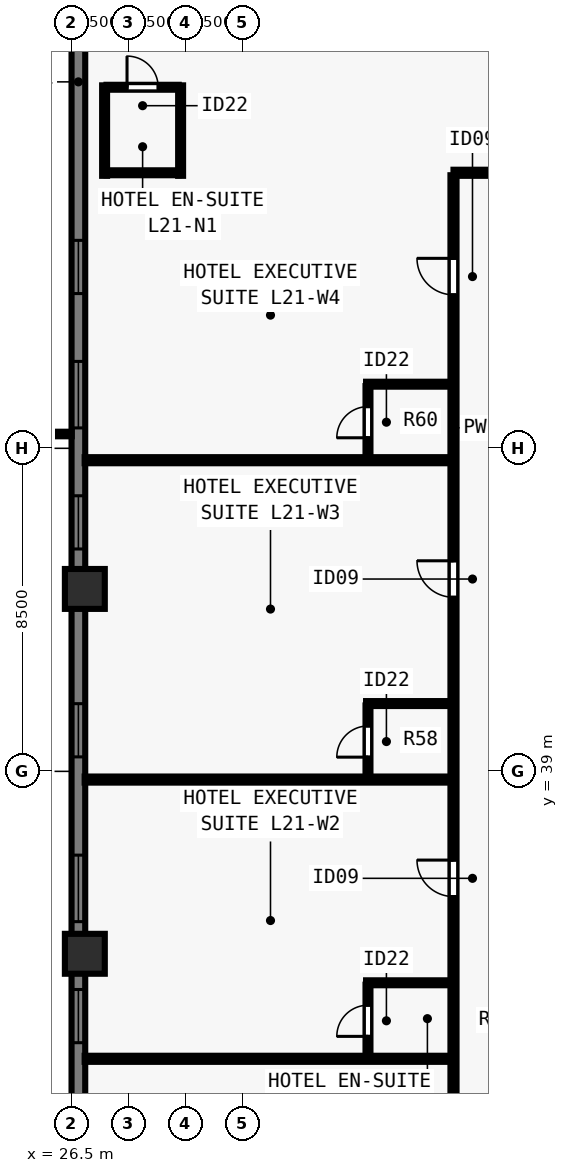
"""IFC4 building model, lengths in metres.
Left out: names, types, materials, properties, quantities, classifications, styles, units other than length and angle.
Written with IfcOpenShell. Run it as: python <this file> out.ifc"""

import sys

from ifc_helpers import new_model, si_unit, direction, frame, frame_2d, origin, origin_2d, place, context, subcontext, project, spatial, rectangle, extrude, element, fill, save


model = new_model("IFC4")
c1 = context("Model", 3, precision=1e-05, world=origin(), true_north=direction((0.0, 1.0)))
c2 = subcontext(c1, "Body", "Model", "MODEL_VIEW")
j1 = project(units=[si_unit("LENGTHUNIT", "METRE"), si_unit("PLANEANGLEUNIT", "RADIAN")], contexts=[c1])
p1 = place(None, origin())
s1 = spatial("IfcSite", under=j1, at=p1, CompositionType="ELEMENT")
p2 = place(p1, origin())
s2 = spatial("IfcBuilding", under=s1, at=p2, CompositionType="ELEMENT")
p3 = place(p2, frame((0.0, 0.0, 79.5)))
s3 = spatial("IfcBuildingStorey", under=s2, at=p3, CompositionType="ELEMENT", Elevation=79.5)
for number, where, z_axis, x_axis in (
    (1, (26.85, 43.8, 0.0), (0.0, 0.0, 1.0), (0.0, 1.0, 0.0)),
    (2, (26.85, 34.2, 0.0), (0.0, 0.0, 1.0), (0.0, 1.0, 0.0)),
):
    element("IfcColumn", number, at=place(p3, frame(where, z_axis=z_axis, x_axis=x_axis)), inside=s3, PredefinedType="COLUMN", context=c2, shape_type="SweptSolid", body=[
        extrude(rectangle(XDim=1.05, YDim=1.05, at=origin_2d()), origin(), (0.0, 0.0, 1.0), 3.5),
    ])
p4 = place(p3, frame((26.68, 16.5, 0.0), z_axis=(0.0, 0.0, 1.0), x_axis=(0.0, 1.0, 0.0)))
e3 = element("IfcWall", 3, at=p4, inside=s3, PredefinedType="SOLIDWALL", context=c2, shape_type="SweptSolid", body=[
    extrude(rectangle(XDim=44.662, YDim=0.36, at=frame_2d((22.331, 0.0))), origin(), (0.0, 0.0, 1.0), 3.28),
])
p5 = place(p4, frame((8.19, 0.0, 0.8)))
e4 = element("IfcOpeningElement", 4, at=p5, cuts=e3, PredefinedType="OPENING", context=c2, shape_type="SweptSolid", body=[
    extrude(rectangle(XDim=1.4, YDim=1.544, at=frame_2d((0.7, 0.772))), frame((0.0, 0.19, 0.0), z_axis=(0.0, -1.0, 0.0), x_axis=(1.0, 0.0, 0.0)), (0.0, 0.0, 1.0), 0.38),
])
p6 = place(p4, frame((11.375, 0.0, 0.8)))
e5 = element("IfcOpeningElement", 5, at=p6, cuts=e3, PredefinedType="OPENING", context=c2, shape_type="SweptSolid", body=[
    extrude(rectangle(XDim=1.75, YDim=1.544, at=frame_2d((0.875, 0.772))), frame((0.0, 0.19, 0.0), z_axis=(0.0, -1.0, 0.0), x_axis=(1.0, 0.0, 0.0)), (0.0, 0.0, 1.0), 0.38),
])
p7 = place(p4, frame((15.361, 0.0, 0.8)))
e6 = element("IfcOpeningElement", 6, at=p7, cuts=e3, PredefinedType="OPENING", context=c2, shape_type="SweptSolid", body=[
    extrude(rectangle(XDim=1.4, YDim=1.544, at=frame_2d((0.7, 0.772))), frame((0.0, 0.19, 0.0), z_axis=(0.0, -1.0, 0.0), x_axis=(1.0, 0.0, 0.0)), (0.0, 0.0, 1.0), 0.38),
])
p8 = place(p4, frame((18.546, 0.0, 0.8)))
e7 = element("IfcOpeningElement", 7, at=p8, cuts=e3, PredefinedType="OPENING", context=c2, shape_type="SweptSolid", body=[
    extrude(rectangle(XDim=1.75, YDim=1.544, at=frame_2d((0.875, 0.772))), frame((0.0, 0.19, 0.0), z_axis=(0.0, -1.0, 0.0), x_axis=(1.0, 0.0, 0.0)), (0.0, 0.0, 1.0), 0.38),
])
p9 = place(p4, frame((22.881, 0.0, 0.8)))
e8 = element("IfcOpeningElement", 8, at=p9, cuts=e3, PredefinedType="OPENING", context=c2, shape_type="SweptSolid", body=[
    extrude(rectangle(XDim=1.4, YDim=1.544, at=frame_2d((0.7, 0.772))), frame((0.0, 0.19, 0.0), z_axis=(0.0, -1.0, 0.0), x_axis=(1.0, 0.0, 0.0)), (0.0, 0.0, 1.0), 0.38),
])
p10 = place(p4, frame((28.351, 0.0, 0.8)))
e9 = element("IfcOpeningElement", 9, at=p10, cuts=e3, PredefinedType="OPENING", context=c2, shape_type="SweptSolid", body=[
    extrude(rectangle(XDim=1.4, YDim=1.544, at=frame_2d((0.7, 0.772))), frame((0.0, 0.19, 0.0), z_axis=(0.0, -1.0, 0.0), x_axis=(1.0, 0.0, 0.0)), (0.0, 0.0, 1.0), 0.38),
])
p11 = place(p4, frame((31.537, 0.0, 0.8)))
e10 = element("IfcOpeningElement", 10, at=p11, cuts=e3, PredefinedType="OPENING", context=c2, shape_type="SweptSolid", body=[
    extrude(rectangle(XDim=1.75, YDim=1.544, at=frame_2d((0.875, 0.772))), frame((0.0, 0.19, 0.0), z_axis=(0.0, -1.0, 0.0), x_axis=(1.0, 0.0, 0.0)), (0.0, 0.0, 1.0), 0.38),
])
p12 = place(p4, frame((35.072, 0.0, 0.8)))
e11 = element("IfcOpeningElement", 11, at=p12, cuts=e3, PredefinedType="OPENING", context=c2, shape_type="SweptSolid", body=[
    extrude(rectangle(XDim=1.4, YDim=1.544, at=frame_2d((0.7, 0.772))), frame((0.0, 0.19, 0.0), z_axis=(0.0, -1.0, 0.0), x_axis=(1.0, 0.0, 0.0)), (0.0, 0.0, 1.0), 0.38),
])
p13 = place(p3, frame((36.55, 54.75, 0.0), z_axis=(0.0, 0.0, 1.0), x_axis=(1.0, 0.0, 0.0)))
e12 = element("IfcWall", 12, at=p13, inside=s3, PredefinedType="PARTITIONING", context=c2, shape_type="SweptSolid", body=[
    extrude(rectangle(XDim=30.9, YDim=0.16, at=frame_2d((15.45, 0.0))), origin(), (0.0, 0.0, 1.0), 3.28),
])
p14 = place(p13, frame((2.83, 0.0, 0.0)))
e13 = element("IfcOpeningElement", 13, at=p14, cuts=e12, PredefinedType="OPENING", context=c2, shape_type="SweptSolid", body=[
    extrude(rectangle(XDim=0.96, YDim=2.15, at=frame_2d((0.48, 1.075))), frame((0.0, 0.09, 0.0), z_axis=(0.0, -1.0, 0.0), x_axis=(1.0, 0.0, 0.0)), (0.0, 0.0, 1.0), 0.18),
])
p15 = place(p13, frame((15.965, 0.0, 0.0)))
e14 = element("IfcOpeningElement", 14, at=p15, cuts=e12, PredefinedType="OPENING", context=c2, shape_type="SweptSolid", body=[
    extrude(rectangle(XDim=0.96, YDim=2.15, at=frame_2d((0.48, 1.075))), frame((0.0, 0.09, 0.0), z_axis=(0.0, -1.0, 0.0), x_axis=(1.0, 0.0, 0.0)), (0.0, 0.0, 1.0), 0.18),
])
p16 = place(p13, frame((28.105, 0.0, 0.0)))
e15 = element("IfcOpeningElement", 15, at=p16, cuts=e12, PredefinedType="OPENING", context=c2, shape_type="SweptSolid", body=[
    extrude(rectangle(XDim=0.96, YDim=2.15, at=frame_2d((0.48, 1.075))), frame((0.0, 0.09, 0.0), z_axis=(0.0, -1.0, 0.0), x_axis=(1.0, 0.0, 0.0)), (0.0, 0.0, 1.0), 0.18),
])
p17 = place(p3, frame((36.55, 23.315, 0.0), z_axis=(0.0, 0.0, 1.0), x_axis=(0.0, 1.0, 0.0)))
e16 = element("IfcWall", 16, at=p17, inside=s3, PredefinedType="PARTITIONING", context=c2, shape_type="SweptSolid", body=[
    extrude(rectangle(XDim=31.37, YDim=0.16, at=frame_2d((15.685, 0.0))), origin(), (0.0, 0.0, 1.0), 3.28),
])
p18 = place(p17, frame((4.848, 0.0, 0.0)))
e17 = element("IfcOpeningElement", 17, at=p18, cuts=e16, PredefinedType="OPENING", context=c2, shape_type="SweptSolid", body=[
    extrude(rectangle(XDim=0.96, YDim=2.15, at=frame_2d((0.48, 1.075))), frame((0.0, 0.09, 0.0), z_axis=(0.0, -1.0, 0.0), x_axis=(1.0, 0.0, 0.0)), (0.0, 0.0, 1.0), 0.18),
])
p19 = place(p17, frame((12.39, 0.0, 0.0)))
e18 = element("IfcOpeningElement", 18, at=p19, cuts=e16, PredefinedType="OPENING", context=c2, shape_type="SweptSolid", body=[
    extrude(rectangle(XDim=0.96, YDim=2.15, at=frame_2d((0.48, 1.075))), frame((0.0, 0.09, 0.0), z_axis=(0.0, -1.0, 0.0), x_axis=(1.0, 0.0, 0.0)), (0.0, 0.0, 1.0), 0.18),
])
p20 = place(p17, frame((20.265, 0.0, 0.0)))
e19 = element("IfcOpeningElement", 19, at=p20, cuts=e16, PredefinedType="OPENING", context=c2, shape_type="SweptSolid", body=[
    extrude(rectangle(XDim=0.96, YDim=2.15, at=frame_2d((0.48, 1.075))), frame((0.0, 0.09, 0.0), z_axis=(0.0, -1.0, 0.0), x_axis=(1.0, 0.0, 0.0)), (0.0, 0.0, 1.0), 0.18),
])
p21 = place(p17, frame((28.223, 0.0, 0.0)))
e20 = element("IfcOpeningElement", 20, at=p21, cuts=e16, PredefinedType="OPENING", context=c2, shape_type="SweptSolid", body=[
    extrude(rectangle(XDim=0.96, YDim=2.15, at=frame_2d((0.48, 1.075))), frame((0.0, 0.09, 0.0), z_axis=(0.0, -1.0, 0.0), x_axis=(1.0, 0.0, 0.0)), (0.0, 0.0, 1.0), 0.18),
])
for number, where, z_axis, x_axis in (
    (21, (27.37, 54.67, 0.0), (0.0, 0.0, 1.0), (0.0, 1.0, 0.0)),
    (22, (29.37, 54.67, 0.0), (0.0, 0.0, 1.0), (0.0, 1.0, 0.0)),
):
    element("IfcWall", number, at=place(p3, frame(where, z_axis=z_axis, x_axis=x_axis)), inside=s3, PredefinedType="PLUMBINGWALL", context=c2, shape_type="SweptSolid", body=[
        extrude(rectangle(XDim=2.38, YDim=0.13, at=frame_2d((1.19, 0.0))), origin(), (0.0, 0.0, 1.0), 3.28),
    ])
p22 = place(p3, frame((27.42, 57.0, 0.0), z_axis=(0.0, 0.0, 1.0), x_axis=(1.0, 0.0, 0.0)))
e23 = element("IfcWall", 23, at=p22, inside=s3, PredefinedType="PLUMBINGWALL", context=c2, shape_type="SweptSolid", body=[
    extrude(rectangle(XDim=1.9, YDim=0.13, at=frame_2d((0.95, 0.0))), origin(), (0.0, 0.0, 1.0), 3.28),
])
p23 = place(p22, frame((0.54, 0.0, 0.0)))
e24 = element("IfcOpeningElement", 24, at=p23, cuts=e23, PredefinedType="OPENING", context=c2, shape_type="SweptSolid", body=[
    extrude(rectangle(XDim=0.82, YDim=2.1, at=frame_2d((0.41, 1.05))), frame((0.0, 0.075, 0.0), z_axis=(0.0, -1.0, 0.0), x_axis=(1.0, 0.0, 0.0)), (0.0, 0.0, 1.0), 0.15),
])
p24 = place(p3, frame((27.42, 54.75, 0.0), z_axis=(0.0, 0.0, 1.0), x_axis=(1.0, 0.0, 0.0)))
e25 = element("IfcWall", 25, at=p24, inside=s3, PredefinedType="PLUMBINGWALL", context=c2, shape_type="SweptSolid", body=[
    extrude(rectangle(XDim=1.9, YDim=0.13, at=frame_2d((0.95, 0.0))), origin(), (0.0, 0.0, 1.0), 3.28),
])
p25 = place(p3, frame((26.845, 31.437, 0.0), z_axis=(0.0, 0.0, 1.0), x_axis=(1.0, 0.0, 0.0)))
e26 = element("IfcWall", 26, at=p25, inside=s3, PredefinedType="PARTITIONING", context=c2, shape_type="SweptSolid", body=[
    extrude(rectangle(XDim=9.64, YDim=0.16, at=frame_2d((4.82, 0.0))), origin(), (0.0, 0.0, 1.0), 3.28),
])
p26 = place(p3, frame((34.25, 33.437, 0.0), z_axis=(0.0, 0.0, 1.0), x_axis=(1.0, 0.0, 0.0)))
e27 = element("IfcWall", 27, at=p26, inside=s3, PredefinedType="PLUMBINGWALL", context=c2, shape_type="SweptSolid", body=[
    extrude(rectangle(XDim=2.235, YDim=0.13, at=frame_2d((1.118, 0.0))), origin(), (0.0, 0.0, 1.0), 3.28),
])
p27 = place(p3, frame((34.3, 31.502, 0.0), z_axis=(0.0, 0.0, 1.0), x_axis=(0.0, 1.0, 0.0)))
e28 = element("IfcWall", 28, at=p27, inside=s3, PredefinedType="PLUMBINGWALL", context=c2, shape_type="SweptSolid", body=[
    extrude(rectangle(XDim=1.885, YDim=0.13, at=frame_2d((0.942, 0.0))), origin(), (0.0, 0.0, 1.0), 3.28),
])
p28 = place(p27, frame((0.525, 0.0, 0.0)))
e29 = element("IfcOpeningElement", 29, at=p28, cuts=e28, PredefinedType="OPENING", context=c2, shape_type="SweptSolid", body=[
    extrude(rectangle(XDim=0.82, YDim=2.1, at=frame_2d((0.41, 1.05))), frame((0.0, 0.075, 0.0), z_axis=(0.0, -1.0, 0.0), x_axis=(1.0, 0.0, 0.0)), (0.0, 0.0, 1.0), 0.15),
])
p29 = place(p3, frame((26.845, 38.784, 0.0), z_axis=(0.0, 0.0, 1.0), x_axis=(1.0, 0.0, 0.0)))
e30 = element("IfcWall", 30, at=p29, inside=s3, PredefinedType="PARTITIONING", context=c2, shape_type="SweptSolid", body=[
    extrude(rectangle(XDim=9.64, YDim=0.16, at=frame_2d((4.82, 0.0))), origin(), (0.0, 0.0, 1.0), 2.849),
])
p30 = place(p3, frame((34.25, 40.784, 0.0), z_axis=(0.0, 0.0, 1.0), x_axis=(1.0, 0.0, 0.0)))
e31 = element("IfcWall", 31, at=p30, inside=s3, PredefinedType="PLUMBINGWALL", context=c2, shape_type="SweptSolid", body=[
    extrude(rectangle(XDim=2.235, YDim=0.13, at=frame_2d((1.118, 0.0))), origin(), (0.0, 0.0, 1.0), 2.849),
])
p31 = place(p3, frame((34.3, 38.849, 0.0), z_axis=(0.0, 0.0, 1.0), x_axis=(0.0, 1.0, 0.0)))
e32 = element("IfcWall", 32, at=p31, inside=s3, PredefinedType="PLUMBINGWALL", context=c2, shape_type="SweptSolid", body=[
    extrude(rectangle(XDim=1.885, YDim=0.13, at=frame_2d((0.942, 0.0))), origin(), (0.0, 0.0, 1.0), 3.28),
])
p32 = place(p31, frame((0.525, 0.0, 0.0)))
e33 = element("IfcOpeningElement", 33, at=p32, cuts=e32, PredefinedType="OPENING", context=c2, shape_type="SweptSolid", body=[
    extrude(rectangle(XDim=0.82, YDim=2.1, at=frame_2d((0.41, 1.05))), frame((0.0, 0.075, 0.0), z_axis=(0.0, -1.0, 0.0), x_axis=(1.0, 0.0, 0.0)), (0.0, 0.0, 1.0), 0.15),
])
p33 = place(p3, frame((26.845, 47.187, 0.0), z_axis=(0.0, 0.0, 1.0), x_axis=(1.0, 0.0, 0.0)))
e34 = element("IfcWall", 34, at=p33, inside=s3, PredefinedType="PARTITIONING", context=c2, shape_type="SweptSolid", body=[
    extrude(rectangle(XDim=9.64, YDim=0.16, at=frame_2d((4.82, 0.0))), origin(), (0.0, 0.0, 1.0), 3.28),
])
p34 = place(p3, frame((34.25, 49.187, 0.0), z_axis=(0.0, 0.0, 1.0), x_axis=(1.0, 0.0, 0.0)))
e35 = element("IfcWall", 35, at=p34, inside=s3, PredefinedType="PLUMBINGWALL", context=c2, shape_type="SweptSolid", body=[
    extrude(rectangle(XDim=2.235, YDim=0.13, at=frame_2d((1.118, 0.0))), origin(), (0.0, 0.0, 1.0), 3.28),
])
p35 = place(p3, frame((34.3, 47.252, 0.0), z_axis=(0.0, 0.0, 1.0), x_axis=(0.0, 1.0, 0.0)))
e36 = element("IfcWall", 36, at=p35, inside=s3, PredefinedType="PLUMBINGWALL", context=c2, shape_type="SweptSolid", body=[
    extrude(rectangle(XDim=1.885, YDim=0.13, at=frame_2d((0.942, 0.0))), origin(), (0.0, 0.0, 1.0), 3.28),
])
p36 = place(p35, frame((0.525, 0.0, 0.0)))
e37 = element("IfcOpeningElement", 37, at=p36, cuts=e36, PredefinedType="OPENING", context=c2, shape_type="SweptSolid", body=[
    extrude(rectangle(XDim=0.82, YDim=2.1, at=frame_2d((0.41, 1.05))), frame((0.0, 0.075, 0.0), z_axis=(0.0, -1.0, 0.0), x_axis=(1.0, 0.0, 0.0)), (0.0, 0.0, 1.0), 0.15),
])
p37 = place(p7, origin())
e38 = element("IfcWindow", 38, at=p37, inside=s3, PartitioningType="SINGLE_PANEL", PredefinedType="WINDOW", context=c2, shape_type="SweptSolid", body=[
    extrude(rectangle(XDim=1.4, YDim=1.544, at=frame_2d((0.7, 0.772))), frame((0.0, -0.05, 0.0), z_axis=(0.0, -1.0, 0.0), x_axis=(1.0, 0.0, 0.0)), (0.0, 0.0, 1.0), 0.06),
])
fill(e6, e38)
p38 = place(p8, origin())
e39 = element("IfcWindow", 39, at=p38, inside=s3, PartitioningType="SINGLE_PANEL", PredefinedType="WINDOW", context=c2, shape_type="SweptSolid", body=[
    extrude(rectangle(XDim=1.75, YDim=1.544, at=frame_2d((0.875, 0.772))), frame((0.0, -0.05, 0.0), z_axis=(0.0, -1.0, 0.0), x_axis=(1.0, 0.0, 0.0)), (0.0, 0.0, 1.0), 0.06),
])
fill(e7, e39)
p39 = place(p9, origin())
e40 = element("IfcWindow", 40, at=p39, inside=s3, PartitioningType="SINGLE_PANEL", PredefinedType="WINDOW", context=c2, shape_type="SweptSolid", body=[
    extrude(rectangle(XDim=1.4, YDim=1.544, at=frame_2d((0.7, 0.772))), frame((0.0, -0.05, 0.0), z_axis=(0.0, -1.0, 0.0), x_axis=(1.0, 0.0, 0.0)), (0.0, 0.0, 1.0), 0.06),
])
fill(e8, e40)
p40 = place(p10, origin())
e41 = element("IfcWindow", 41, at=p40, inside=s3, PartitioningType="SINGLE_PANEL", PredefinedType="WINDOW", context=c2, shape_type="SweptSolid", body=[
    extrude(rectangle(XDim=1.4, YDim=1.544, at=frame_2d((0.7, 0.772))), frame((0.0, -0.05, 0.0), z_axis=(0.0, -1.0, 0.0), x_axis=(1.0, 0.0, 0.0)), (0.0, 0.0, 1.0), 0.06),
])
fill(e9, e41)
p41 = place(p11, origin())
e42 = element("IfcWindow", 42, at=p41, inside=s3, PartitioningType="SINGLE_PANEL", PredefinedType="WINDOW", context=c2, shape_type="SweptSolid", body=[
    extrude(rectangle(XDim=1.75, YDim=1.544, at=frame_2d((0.875, 0.772))), frame((0.0, -0.05, 0.0), z_axis=(0.0, -1.0, 0.0), x_axis=(1.0, 0.0, 0.0)), (0.0, 0.0, 1.0), 0.06),
])
fill(e10, e42)
p42 = place(p12, origin())
e43 = element("IfcWindow", 43, at=p42, inside=s3, PartitioningType="SINGLE_PANEL", PredefinedType="WINDOW", context=c2, shape_type="SweptSolid", body=[
    extrude(rectangle(XDim=1.4, YDim=1.544, at=frame_2d((0.7, 0.772))), frame((0.0, -0.05, 0.0), z_axis=(0.0, -1.0, 0.0), x_axis=(1.0, 0.0, 0.0)), (0.0, 0.0, 1.0), 0.06),
])
fill(e11, e43)
p43 = place(p23, origin())
e44 = element("IfcDoor", 44, at=p43, inside=s3, OperationType="SINGLE_SWING_LEFT", PredefinedType="DOOR", context=c2, shape_type="SweptSolid", body=[
    extrude(rectangle(XDim=0.82, YDim=2.1, at=frame_2d((0.41, 1.05))), frame((0.0, 0.025, 0.0), z_axis=(0.0, -1.0, 0.0), x_axis=(1.0, 0.0, 0.0)), (0.0, 0.0, 1.0), 0.05),
])
fill(e24, e44)
p44 = place(p28, origin())
e45 = element("IfcDoor", 45, at=p44, inside=s3, OperationType="SINGLE_SWING_LEFT", PredefinedType="DOOR", context=c2, shape_type="SweptSolid", body=[
    extrude(rectangle(XDim=0.82, YDim=2.1, at=frame_2d((0.41, 1.05))), frame((0.0, 0.025, 0.0), z_axis=(0.0, -1.0, 0.0), x_axis=(1.0, 0.0, 0.0)), (0.0, 0.0, 1.0), 0.05),
])
fill(e29, e45)
p45 = place(p19, origin())
e46 = element("IfcDoor", 46, at=p45, inside=s3, OperationType="SINGLE_SWING_RIGHT", PredefinedType="DOOR", context=c2, shape_type="SweptSolid", body=[
    extrude(rectangle(XDim=0.96, YDim=2.15, at=frame_2d((0.48, 1.075))), frame((0.0, 0.025, 0.0), z_axis=(0.0, -1.0, 0.0), x_axis=(1.0, 0.0, 0.0)), (0.0, 0.0, 1.0), 0.05),
])
fill(e18, e46)
p46 = place(p32, origin())
e47 = element("IfcDoor", 47, at=p46, inside=s3, OperationType="SINGLE_SWING_LEFT", PredefinedType="DOOR", context=c2, shape_type="SweptSolid", body=[
    extrude(rectangle(XDim=0.82, YDim=2.1, at=frame_2d((0.41, 1.05))), frame((0.0, 0.025, 0.0), z_axis=(0.0, -1.0, 0.0), x_axis=(1.0, 0.0, 0.0)), (0.0, 0.0, 1.0), 0.05),
])
fill(e33, e47)
p47 = place(p20, origin())
e48 = element("IfcDoor", 48, at=p47, inside=s3, OperationType="SINGLE_SWING_RIGHT", PredefinedType="DOOR", context=c2, shape_type="SweptSolid", body=[
    extrude(rectangle(XDim=0.96, YDim=2.15, at=frame_2d((0.48, 1.075))), frame((0.0, 0.025, 0.0), z_axis=(0.0, -1.0, 0.0), x_axis=(1.0, 0.0, 0.0)), (0.0, 0.0, 1.0), 0.05),
])
fill(e19, e48)
p48 = place(p36, origin())
e49 = element("IfcDoor", 49, at=p48, inside=s3, OperationType="SINGLE_SWING_LEFT", PredefinedType="DOOR", context=c2, shape_type="SweptSolid", body=[
    extrude(rectangle(XDim=0.82, YDim=2.1, at=frame_2d((0.41, 1.05))), frame((0.0, 0.025, 0.0), z_axis=(0.0, -1.0, 0.0), x_axis=(1.0, 0.0, 0.0)), (0.0, 0.0, 1.0), 0.05),
])
fill(e37, e49)
p49 = place(p21, origin())
e50 = element("IfcDoor", 50, at=p49, inside=s3, OperationType="SINGLE_SWING_RIGHT", PredefinedType="DOOR", context=c2, shape_type="SweptSolid", body=[
    extrude(rectangle(XDim=0.96, YDim=2.15, at=frame_2d((0.48, 1.075))), frame((0.0, 0.025, 0.0), z_axis=(0.0, -1.0, 0.0), x_axis=(1.0, 0.0, 0.0)), (0.0, 0.0, 1.0), 0.05),
])
fill(e20, e50)
save(model, sys.argv[1])
